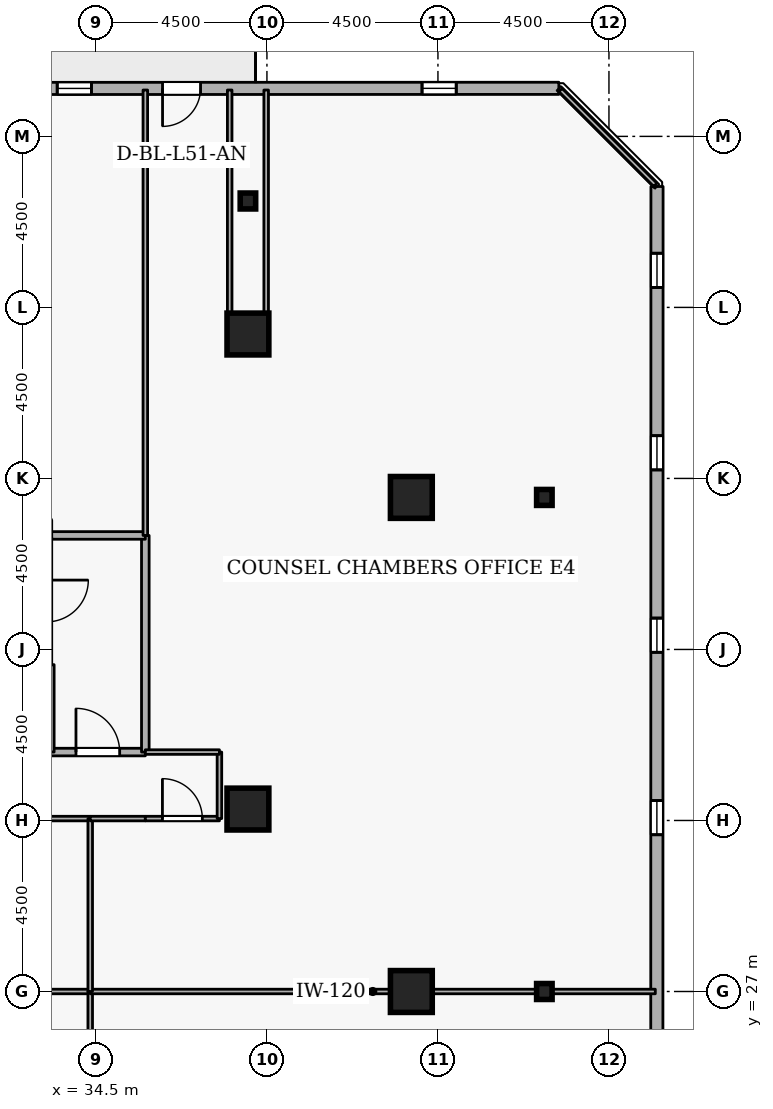
"""IFC4 building model, lengths in metres.
Left out: names, types, materials, properties, quantities, classifications, styles, units other than length and angle.
Written with IfcOpenShell. Run it as: python <this file> out.ifc"""

import sys

from ifc_helpers import new_model, si_unit, direction, frame, frame_2d, origin, origin_2d, place, context, subcontext, project, spatial, rectangle, i_section, extrude, element, fill, save


model = new_model("IFC4")
c1 = context("Model", 3, precision=1e-05, world=origin(), true_north=direction((0.0, 1.0)))
c2 = subcontext(c1, "Body", "Model", "MODEL_VIEW")
j1 = project(units=[si_unit("LENGTHUNIT", "METRE"), si_unit("PLANEANGLEUNIT", "RADIAN")], contexts=[c1])
p1 = place(None, origin())
s1 = spatial("IfcSite", under=j1, at=p1, CompositionType="ELEMENT")
p2 = place(p1, origin())
s2 = spatial("IfcBuilding", under=s1, at=p2, CompositionType="ELEMENT")
p3 = place(p2, frame((0.0, 0.0, 192.9)))
s3 = spatial("IfcBuildingStorey", under=s2, at=p3, CompositionType="ELEMENT", Elevation=192.9)
for number, where, z_axis, x_axis in (
    (1, (42.8, 27.0, 0.0), (0.0, 0.0, 1.0), (1.0, 0.0, 0.0)),
    (2, (42.8, 40.0, 0.0), (0.0, 0.0, 1.0), (1.0, 0.0, 0.0)),
    (3, (38.5, 44.3, 0.0), (0.0, 0.0, 1.0), (1.0, 0.0, 0.0)),
    (4, (38.5, 31.8, 0.0), (0.0, 0.0, 1.0), (1.0, 0.0, 0.0)),
):
    element("IfcColumn", number, at=place(p3, frame(where, z_axis=z_axis, x_axis=x_axis)), inside=s3, PredefinedType="COLUMN", context=c2, shape_type="SweptSolid", body=[
        extrude(rectangle(XDim=1.1, YDim=1.1, at=origin_2d()), origin(), (0.0, 0.0, 1.0), 3.6),
    ])
for number, where, z_axis, x_axis in (
    (5, (46.3, 27.0, 0.0), (0.0, 0.0, 1.0), (1.0, 0.0, 0.0)),
    (6, (46.3, 40.0, 0.0), (0.0, 0.0, 1.0), (1.0, 0.0, 0.0)),
    (7, (38.5, 47.8, 0.0), (0.0, 0.0, 1.0), (1.0, 0.0, 0.0)),
):
    element("IfcColumn", number, at=place(p3, frame(where, z_axis=z_axis, x_axis=x_axis)), inside=s3, PredefinedType="COLUMN", context=c2, shape_type="SweptSolid", body=[
        extrude(i_section(OverallWidth=0.407, OverallDepth=0.419, WebThickness=0.031, FlangeThickness=0.049, FilletRadius=0.015, at=origin_2d()), origin(), (0.0, 0.0, 1.0), 3.6),
    ])
p4 = place(p3, frame((49.257, 14.025, 0.0), z_axis=(0.0, 0.0, 1.0), x_axis=(0.000214431216, 0.99999997701, 0.0)))
e8 = element("IfcWall", 8, at=p4, inside=s3, PredefinedType="STANDARD", context=c2, shape_type="SweptSolid", body=[
    extrude(rectangle(XDim=34.156, YDim=0.32, at=frame_2d((17.078, 0.0))), origin(), (0.0, 0.0, 1.0), 2.7),
])
p5 = place(p4, frame((2.7, 0.0, 0.72)))
e9 = element("IfcOpeningElement", 9, at=p5, cuts=e8, PredefinedType="OPENING", context=c2, shape_type="SweptSolid", body=[
    extrude(rectangle(XDim=0.9, YDim=1.75, at=frame_2d((0.45, 0.875))), frame((0.0, 0.17, 0.0), z_axis=(0.0, -1.0, 0.0), x_axis=(1.0, 0.0, 0.0)), (0.0, 0.0, 1.0), 0.34),
])
p6 = place(p4, frame((7.5, 0.0, 0.72)))
e10 = element("IfcOpeningElement", 10, at=p6, cuts=e8, PredefinedType="OPENING", context=c2, shape_type="SweptSolid", body=[
    extrude(rectangle(XDim=0.9, YDim=1.75, at=frame_2d((0.45, 0.875))), frame((0.0, 0.17, 0.0), z_axis=(0.0, -1.0, 0.0), x_axis=(1.0, 0.0, 0.0)), (0.0, 0.0, 1.0), 0.34),
])
p7 = place(p4, frame((17.1, 0.0, 0.72)))
e11 = element("IfcOpeningElement", 11, at=p7, cuts=e8, PredefinedType="OPENING", context=c2, shape_type="SweptSolid", body=[
    extrude(rectangle(XDim=0.9, YDim=1.75, at=frame_2d((0.45, 0.875))), frame((0.0, 0.17, 0.0), z_axis=(0.0, -1.0, 0.0), x_axis=(1.0, 0.0, 0.0)), (0.0, 0.0, 1.0), 0.34),
])
p8 = place(p4, frame((21.9, 0.0, 0.72)))
e12 = element("IfcOpeningElement", 12, at=p8, cuts=e8, PredefinedType="OPENING", context=c2, shape_type="SweptSolid", body=[
    extrude(rectangle(XDim=0.9, YDim=1.75, at=frame_2d((0.45, 0.875))), frame((0.0, 0.17, 0.0), z_axis=(0.0, -1.0, 0.0), x_axis=(1.0, 0.0, 0.0)), (0.0, 0.0, 1.0), 0.34),
])
p9 = place(p4, frame((26.7, 0.0, 0.72)))
e13 = element("IfcOpeningElement", 13, at=p9, cuts=e8, PredefinedType="OPENING", context=c2, shape_type="SweptSolid", body=[
    extrude(rectangle(XDim=0.9, YDim=1.75, at=frame_2d((0.45, 0.875))), frame((0.0, 0.17, 0.0), z_axis=(0.0, -1.0, 0.0), x_axis=(1.0, 0.0, 0.0)), (0.0, 0.0, 1.0), 0.34),
])
p10 = place(p4, frame((31.5, 0.0, 0.72)))
e14 = element("IfcOpeningElement", 14, at=p10, cuts=e8, PredefinedType="OPENING", context=c2, shape_type="SweptSolid", body=[
    extrude(rectangle(XDim=0.9, YDim=1.75, at=frame_2d((0.45, 0.875))), frame((0.0, 0.17, 0.0), z_axis=(0.0, -1.0, 0.0), x_axis=(1.0, 0.0, 0.0)), (0.0, 0.0, 1.0), 0.34),
])
p11 = place(p3, frame((46.681, 50.765, 0.0), z_axis=(0.0, 0.0, 1.0), x_axis=(-0.99999997701, -0.000214431216, 0.0)))
e15 = element("IfcWall", 15, at=p11, inside=s3, PredefinedType="STANDARD", context=c2, shape_type="SweptSolid", body=[
    extrude(rectangle(XDim=34.156, YDim=0.32, at=frame_2d((17.078, 0.0))), origin(), (0.0, 0.0, 1.0), 2.7),
])
p12 = place(p11, frame((9.428, 0.0, 0.0)))
e16 = element("IfcOpeningElement", 16, at=p12, cuts=e15, PredefinedType="OPENING", context=c2, shape_type="SweptSolid", body=[
    extrude(rectangle(XDim=1.0, YDim=2.08, at=frame_2d((0.5, 1.04))), frame((0.0, 0.17, 0.0), z_axis=(0.0, -1.0, 0.0), x_axis=(1.0, 0.0, 0.0)), (0.0, 0.0, 1.0), 0.34),
])
p13 = place(p11, frame((2.7, 0.0, 0.72)))
e17 = element("IfcOpeningElement", 17, at=p13, cuts=e15, PredefinedType="OPENING", context=c2, shape_type="SweptSolid", body=[
    extrude(rectangle(XDim=0.9, YDim=1.75, at=frame_2d((0.45, 0.875))), frame((0.0, 0.17, 0.0), z_axis=(0.0, -1.0, 0.0), x_axis=(1.0, 0.0, 0.0)), (0.0, 0.0, 1.0), 0.34),
])
p14 = place(p11, frame((12.3, 0.0, 0.72)))
e18 = element("IfcOpeningElement", 18, at=p14, cuts=e15, PredefinedType="OPENING", context=c2, shape_type="SweptSolid", body=[
    extrude(rectangle(XDim=0.9, YDim=1.75, at=frame_2d((0.45, 0.875))), frame((0.0, 0.17, 0.0), z_axis=(0.0, -1.0, 0.0), x_axis=(1.0, 0.0, 0.0)), (0.0, 0.0, 1.0), 0.34),
])
p15 = place(p11, frame((17.1, 0.0, 0.72)))
e19 = element("IfcOpeningElement", 19, at=p15, cuts=e15, PredefinedType="OPENING", context=c2, shape_type="SweptSolid", body=[
    extrude(rectangle(XDim=0.9, YDim=1.75, at=frame_2d((0.45, 0.875))), frame((0.0, 0.17, 0.0), z_axis=(0.0, -1.0, 0.0), x_axis=(1.0, 0.0, 0.0)), (0.0, 0.0, 1.0), 0.34),
])
p16 = place(p11, frame((21.9, 0.0, 0.72)))
e20 = element("IfcOpeningElement", 20, at=p16, cuts=e15, PredefinedType="OPENING", context=c2, shape_type="SweptSolid", body=[
    extrude(rectangle(XDim=0.9, YDim=1.75, at=frame_2d((0.45, 0.875))), frame((0.0, 0.17, 0.0), z_axis=(0.0, -1.0, 0.0), x_axis=(1.0, 0.0, 0.0)), (0.0, 0.0, 1.0), 0.34),
])
p17 = place(p11, frame((26.7, 0.0, 0.72)))
e21 = element("IfcOpeningElement", 21, at=p17, cuts=e15, PredefinedType="OPENING", context=c2, shape_type="SweptSolid", body=[
    extrude(rectangle(XDim=0.9, YDim=1.75, at=frame_2d((0.45, 0.875))), frame((0.0, 0.17, 0.0), z_axis=(0.0, -1.0, 0.0), x_axis=(1.0, 0.0, 0.0)), (0.0, 0.0, 1.0), 0.34),
])
p18 = place(p11, frame((31.5, 0.0, 0.72)))
e22 = element("IfcOpeningElement", 22, at=p18, cuts=e15, PredefinedType="OPENING", context=c2, shape_type="SweptSolid", body=[
    extrude(rectangle(XDim=0.9, YDim=1.75, at=frame_2d((0.45, 0.875))), frame((0.0, 0.17, 0.0), z_axis=(0.0, -1.0, 0.0), x_axis=(1.0, 0.0, 0.0)), (0.0, 0.0, 1.0), 0.34),
])
p19 = place(p3, frame((33.3, 33.3, 0.0), z_axis=(0.0, 0.0, 1.0), x_axis=(1.0, 0.0, 0.0)))
e23 = element("IfcWall", 23, at=p19, inside=s3, PredefinedType="STANDARD", context=c2, shape_type="SweptSolid", body=[
    extrude(rectangle(XDim=2.5, YDim=0.2, at=frame_2d((1.25, 0.0))), origin(), (0.0, 0.0, 1.0), 3.34),
])
p20 = place(p19, frame((0.675, 0.0, 0.0)))
e24 = element("IfcOpeningElement", 24, at=p20, cuts=e23, PredefinedType="OPENING", context=c2, shape_type="SweptSolid", body=[
    extrude(rectangle(XDim=1.15, YDim=2.1, at=frame_2d((0.575, 1.05))), frame((0.0, 0.11, 0.0), z_axis=(0.0, -1.0, 0.0), x_axis=(1.0, 0.0, 0.0)), (0.0, 0.0, 1.0), 0.22),
])
p21 = place(p3, frame((35.8, 33.3, 0.0), z_axis=(0.0, 0.0, 1.0), x_axis=(0.0, 1.0, 0.0)))
e25 = element("IfcWall", 25, at=p21, inside=s3, PredefinedType="STANDARD", context=c2, shape_type="SweptSolid", body=[
    extrude(rectangle(XDim=5.7, YDim=0.2, at=frame_2d((2.85, 0.0))), origin(), (0.0, 0.0, 1.0), 3.34),
])
p22 = place(p3, frame((35.8, 39.0, 0.0), z_axis=(0.0, 0.0, 1.0), x_axis=(-1.0, 0.0, 0.0)))
e26 = element("IfcWall", 26, at=p22, inside=s3, PredefinedType="STANDARD", context=c2, shape_type="SweptSolid", body=[
    extrude(rectangle(XDim=2.5, YDim=0.2, at=frame_2d((1.25, 0.0))), origin(), (0.0, 0.0, 1.0), 3.34),
])
p23 = place(p3, frame((33.3, 35.6, 0.0), z_axis=(0.0, 0.0, 1.0), x_axis=(0.0, -1.0, 0.0)))
e27 = element("IfcWall", 27, at=p23, inside=s3, PredefinedType="STANDARD", context=c2, shape_type="SweptSolid", body=[
    extrude(rectangle(XDim=2.3, YDim=0.2, at=frame_2d((1.15, 0.0))), origin(), (0.0, 0.0, 1.0), 2.545),
])
p24 = place(p3, frame((32.45, 27.0, 0.0), z_axis=(0.0, 0.0, 1.0), x_axis=(1.0, 0.0, 0.0)))
e28 = element("IfcWall", 28, at=p24, inside=s3, PredefinedType="PARTITIONING", context=c2, shape_type="SweptSolid", body=[
    extrude(rectangle(XDim=1.9, YDim=0.12, at=frame_2d((0.95, 0.0))), origin(), (0.0, 0.0, 1.0), 3.34),
])
p25 = place(p3, frame((34.35, 27.0, 0.0), z_axis=(0.0, 0.0, 1.0), x_axis=(0.0, -1.0, 0.0)))
e29 = element("IfcWall", 29, at=p25, inside=s3, PredefinedType="PARTITIONING", context=c2, shape_type="SweptSolid", body=[
    extrude(rectangle(XDim=4.55, YDim=0.12, at=frame_2d((2.275, 0.0))), origin(), (0.0, 0.0, 1.0), 3.34),
])
p26 = place(p3, frame((34.35, 27.0, 0.0), z_axis=(0.0, 0.0, 1.0), x_axis=(1.0, 0.0, 0.0)))
e30 = element("IfcWall", 30, at=p26, inside=s3, PredefinedType="PARTITIONING", context=c2, shape_type="SweptSolid", body=[
    extrude(rectangle(XDim=14.87, YDim=0.12, at=frame_2d((7.435, 0.0))), origin(), (0.0, 0.0, 1.0), 2.882),
])
p27 = place(p3, frame((32.45, 31.55, 0.0), z_axis=(0.0, 0.0, 1.0), x_axis=(1.0, 0.0, 0.0)))
e31 = element("IfcWall", 31, at=p27, inside=s3, PredefinedType="PARTITIONING", context=c2, shape_type="SweptSolid", body=[
    extrude(rectangle(XDim=1.9, YDim=0.12, at=frame_2d((0.95, 0.0))), origin(), (0.0, 0.0, 1.0), 3.34),
])
p28 = place(p3, frame((34.35, 31.55, 0.0), z_axis=(0.0, 0.0, 1.0), x_axis=(0.0, -1.0, 0.0)))
e32 = element("IfcWall", 32, at=p28, inside=s3, PredefinedType="PARTITIONING", context=c2, shape_type="SweptSolid", body=[
    extrude(rectangle(XDim=4.55, YDim=0.12, at=frame_2d((2.275, 0.0))), origin(), (0.0, 0.0, 1.0), 3.34),
])
p29 = place(p3, frame((34.35, 31.55, 0.0), z_axis=(0.0, 0.0, 1.0), x_axis=(1.0, 0.0, 0.0)))
e33 = element("IfcWall", 33, at=p29, inside=s3, PredefinedType="PARTITIONING", context=c2, shape_type="SweptSolid", body=[
    extrude(rectangle(XDim=1.45, YDim=0.12, at=frame_2d((0.725, 0.0))), origin(), (0.0, 0.0, 1.0), 3.34),
])
p30 = place(p3, frame((35.8, 31.55, 0.0), z_axis=(0.0, 0.0, 1.0), x_axis=(1.0, 0.0, 0.0)))
e34 = element("IfcWall", 34, at=p30, inside=s3, PredefinedType="PARTITIONING", context=c2, shape_type="SweptSolid", body=[
    extrude(rectangle(XDim=1.95, YDim=0.12, at=frame_2d((0.975, 0.0))), origin(), (0.0, 0.0, 1.0), 3.34),
])
p31 = place(p30, frame((0.45, 0.0, 0.0)))
e35 = element("IfcOpeningElement", 35, at=p31, cuts=e34, PredefinedType="OPENING", context=c2, shape_type="SweptSolid", body=[
    extrude(rectangle(XDim=1.05, YDim=2.1, at=frame_2d((0.525, 1.05))), frame((0.0, 0.07, 0.0), z_axis=(0.0, -1.0, 0.0), x_axis=(1.0, 0.0, 0.0)), (0.0, 0.0, 1.0), 0.14),
])
p32 = place(p3, frame((37.75, 31.55, 0.0), z_axis=(0.0, 0.0, 1.0), x_axis=(0.0, 1.0, 0.0)))
e36 = element("IfcWall", 36, at=p32, inside=s3, PredefinedType="PARTITIONING", context=c2, shape_type="SweptSolid", body=[
    extrude(rectangle(XDim=1.75, YDim=0.12, at=frame_2d((0.875, 0.0))), origin(), (0.0, 0.0, 1.0), 3.34),
])
p33 = place(p3, frame((37.75, 33.3, 0.0), z_axis=(0.0, 0.0, 1.0), x_axis=(-1.0, 0.0, 0.0)))
e37 = element("IfcWall", 37, at=p33, inside=s3, PredefinedType="PARTITIONING", context=c2, shape_type="SweptSolid", body=[
    extrude(rectangle(XDim=1.95, YDim=0.12, at=frame_2d((0.975, 0.0))), origin(), (0.0, 0.0, 1.0), 3.34),
])
p34 = place(p3, frame((35.8, 39.0, 0.0), z_axis=(0.0, 0.0, 1.0), x_axis=(0.0, 1.0, 0.0)))
e38 = element("IfcWall", 38, at=p34, inside=s3, PredefinedType="PARTITIONING", context=c2, shape_type="SweptSolid", body=[
    extrude(rectangle(XDim=11.72, YDim=0.12, at=frame_2d((5.86, 0.0))), origin(), (0.0, 0.0, 1.0), 3.34),
])
for number, where, z_axis, x_axis in (
    (39, (38.02, 50.72, 0.0), (0.0, 0.0, 1.0), (0.0, -1.0, 0.0)),
    (40, (38.98, 44.3, 0.0), (0.0, 0.0, 1.0), (0.0, 1.0, 0.0)),
):
    element("IfcWall", number, at=place(p3, frame(where, z_axis=z_axis, x_axis=x_axis)), inside=s3, PredefinedType="PARTITIONING", context=c2, shape_type="SweptSolid", body=[
        extrude(rectangle(XDim=6.42, YDim=0.12, at=frame_2d((3.21, 0.0))), origin(), (0.0, 0.0, 1.0), 3.34),
    ])
p35 = place(p3, frame((46.725, 50.72, 0.0), z_axis=(0.0, 0.0, 1.0), x_axis=(0.707106781187, -0.707106781187, 0.0)))
e41 = element("IfcWall", 41, at=p35, inside=s3, PredefinedType="PARTITIONING", context=c2, shape_type="SweptSolid", body=[
    extrude(rectangle(XDim=3.528, YDim=0.12, at=frame_2d((1.764, 0.0))), origin(), (0.0, 0.0, 1.0), 3.34),
])
p36 = place(p7, origin())
e42 = element("IfcWindow", 42, at=p36, inside=s3, PartitioningType="SINGLE_PANEL", PredefinedType="WINDOW", context=c2, shape_type="SweptSolid", body=[
    extrude(rectangle(XDim=0.9, YDim=1.75, at=frame_2d((0.45, 0.875))), frame((0.0, 0.03, 0.0), z_axis=(0.0, -1.0, 0.0), x_axis=(1.0, 0.0, 0.0)), (0.0, 0.0, 1.0), 0.06),
])
fill(e11, e42)
p37 = place(p8, origin())
e43 = element("IfcWindow", 43, at=p37, inside=s3, PartitioningType="SINGLE_PANEL", PredefinedType="WINDOW", context=c2, shape_type="SweptSolid", body=[
    extrude(rectangle(XDim=0.9, YDim=1.75, at=frame_2d((0.45, 0.875))), frame((0.0, 0.03, 0.0), z_axis=(0.0, -1.0, 0.0), x_axis=(1.0, 0.0, 0.0)), (0.0, 0.0, 1.0), 0.06),
])
fill(e12, e43)
p38 = place(p9, origin())
e44 = element("IfcWindow", 44, at=p38, inside=s3, PartitioningType="SINGLE_PANEL", PredefinedType="WINDOW", context=c2, shape_type="SweptSolid", body=[
    extrude(rectangle(XDim=0.9, YDim=1.75, at=frame_2d((0.45, 0.875))), frame((0.0, 0.03, 0.0), z_axis=(0.0, -1.0, 0.0), x_axis=(1.0, 0.0, 0.0)), (0.0, 0.0, 1.0), 0.06),
])
fill(e13, e44)
p39 = place(p10, origin())
e45 = element("IfcWindow", 45, at=p39, inside=s3, PartitioningType="SINGLE_PANEL", PredefinedType="WINDOW", context=c2, shape_type="SweptSolid", body=[
    extrude(rectangle(XDim=0.9, YDim=1.75, at=frame_2d((0.45, 0.875))), frame((0.0, 0.03, 0.0), z_axis=(0.0, -1.0, 0.0), x_axis=(1.0, 0.0, 0.0)), (0.0, 0.0, 1.0), 0.06),
])
fill(e14, e45)
p40 = place(p12, origin())
e46 = element("IfcDoor", 46, at=p40, inside=s3, OperationType="SINGLE_SWING_RIGHT", PredefinedType="DOOR", context=c2, shape_type="SweptSolid", body=[
    extrude(rectangle(XDim=1.0, YDim=2.08, at=frame_2d((0.5, 1.04))), frame((0.0, 0.025, 0.0), z_axis=(0.0, -1.0, 0.0), x_axis=(1.0, 0.0, 0.0)), (0.0, 0.0, 1.0), 0.05),
])
fill(e16, e46)
p41 = place(p13, origin())
e47 = element("IfcWindow", 47, at=p41, inside=s3, PartitioningType="SINGLE_PANEL", PredefinedType="WINDOW", context=c2, shape_type="SweptSolid", body=[
    extrude(rectangle(XDim=0.9, YDim=1.75, at=frame_2d((0.45, 0.875))), frame((0.0, 0.03, 0.0), z_axis=(0.0, -1.0, 0.0), x_axis=(1.0, 0.0, 0.0)), (0.0, 0.0, 1.0), 0.06),
])
fill(e17, e47)
p42 = place(p14, origin())
e48 = element("IfcWindow", 48, at=p42, inside=s3, PartitioningType="SINGLE_PANEL", PredefinedType="WINDOW", context=c2, shape_type="SweptSolid", body=[
    extrude(rectangle(XDim=0.9, YDim=1.75, at=frame_2d((0.45, 0.875))), frame((0.0, 0.03, 0.0), z_axis=(0.0, -1.0, 0.0), x_axis=(1.0, 0.0, 0.0)), (0.0, 0.0, 1.0), 0.06),
])
fill(e18, e48)
p43 = place(p20, origin())
e49 = element("IfcDoor", 49, at=p43, inside=s3, OperationType="SINGLE_SWING_LEFT", PredefinedType="DOOR", context=c2, shape_type="SweptSolid", body=[
    extrude(rectangle(XDim=1.15, YDim=2.1, at=frame_2d((0.575, 1.05))), frame((0.0, 0.025, 0.0), z_axis=(0.0, -1.0, 0.0), x_axis=(1.0, 0.0, 0.0)), (0.0, 0.0, 1.0), 0.05),
])
fill(e24, e49)
p44 = place(p31, origin())
e50 = element("IfcDoor", 50, at=p44, inside=s3, OperationType="SINGLE_SWING_LEFT", PredefinedType="DOOR", context=c2, shape_type="SweptSolid", body=[
    extrude(rectangle(XDim=1.05, YDim=2.1, at=frame_2d((0.525, 1.05))), frame((0.0, 0.025, 0.0), z_axis=(0.0, -1.0, 0.0), x_axis=(1.0, 0.0, 0.0)), (0.0, 0.0, 1.0), 0.05),
])
fill(e35, e50)
save(model, sys.argv[1])
